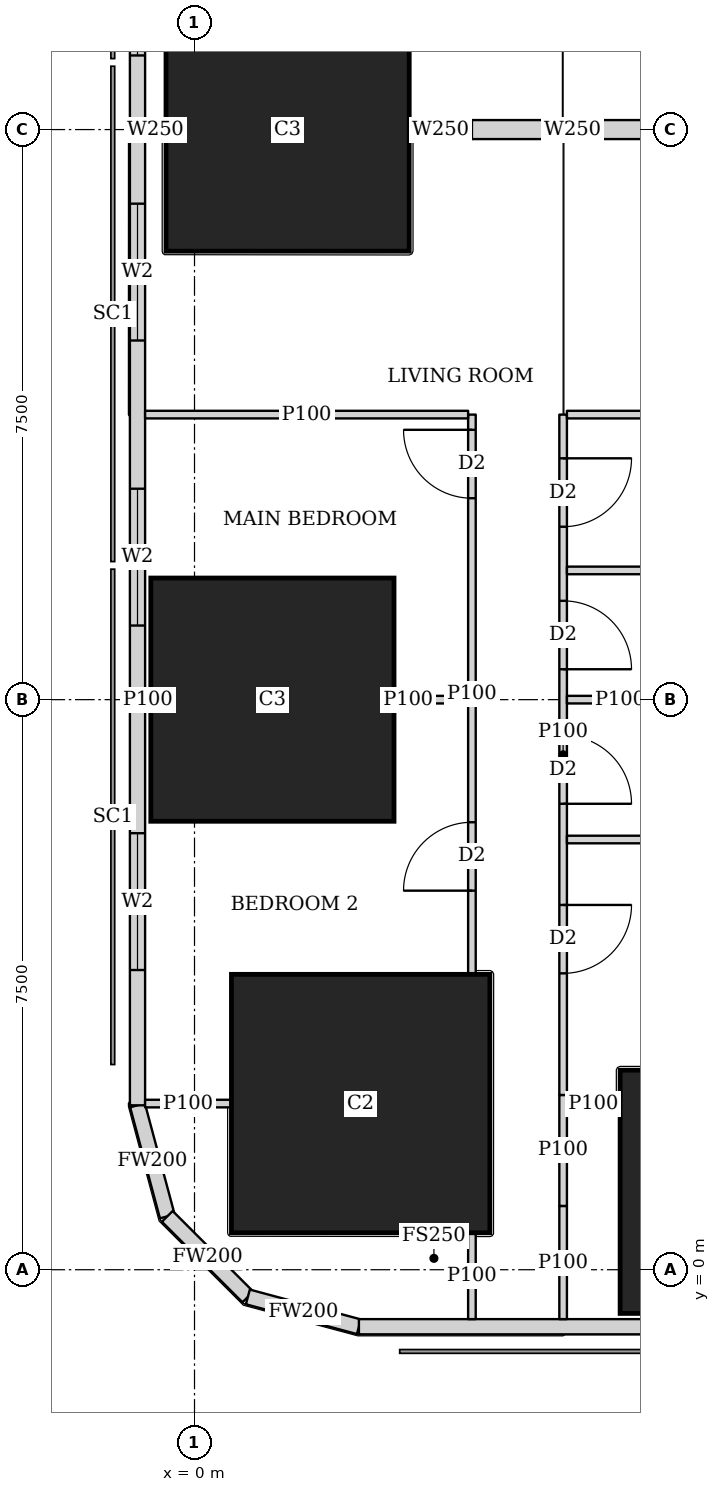
"""IFC4 building model, lengths in metres.
Left out: names, types, materials, properties, quantities, classifications, styles, units other than length and angle.
Written with IfcOpenShell. Run it as: python <this file> out.ifc"""

import sys

from ifc_helpers import new_model, si_unit, direction, frame, frame_2d, origin, origin_2d, place, context, subcontext, project, spatial, rectangle, extrude, element, fill, save


model = new_model("IFC4")
c1 = context("Model", 3, precision=1e-05, world=origin(), true_north=direction((0.0, 1.0)))
c2 = subcontext(c1, "Body", "Model", "MODEL_VIEW")
j1 = project(units=[si_unit("LENGTHUNIT", "METRE"), si_unit("PLANEANGLEUNIT", "RADIAN")], contexts=[c1])
p1 = place(None, origin())
s1 = spatial("IfcSite", under=j1, at=p1, CompositionType="ELEMENT")
p2 = place(p1, origin())
s2 = spatial("IfcBuilding", under=s1, at=p2, CompositionType="ELEMENT")
p3 = place(p2, frame((0.0, 0.0, 23.75)))
s3 = spatial("IfcBuildingStorey", under=s2, at=p3, CompositionType="ELEMENT", Elevation=23.75)
p4 = place(p3, frame((7.2, 1.025, 0.0), z_axis=(0.0, 0.0, 1.0), x_axis=(1.0, 0.0, 0.0)))
e1 = element("IfcColumn", 1, at=p4, inside=s3, PredefinedType="COLUMN", context=c2, shape_type="SweptSolid", body=[
    extrude(rectangle(XDim=3.2, YDim=3.2, at=origin_2d()), origin(), (0.0, 0.0, 1.0), 3.75),
])
p5 = place(p3, frame((2.186, 2.186, 0.0), z_axis=(0.0, 0.0, 1.0), x_axis=(1.0, 0.0, 0.0)))
e2 = element("IfcColumn", 2, at=p5, inside=s3, PredefinedType="COLUMN", context=c2, shape_type="SweptSolid", body=[
    extrude(rectangle(XDim=3.4, YDim=3.4, at=origin_2d()), origin(), (0.0, 0.0, 1.0), 3.75),
])
for number, where, z_axis, x_axis in (
    (3, (1.025, 7.5, 0.0), (0.0, 0.0, 1.0), (1.0, 0.0, 0.0)),
    (4, (1.225, 15.0, 0.0), (0.0, 0.0, 1.0), (1.0, 0.0, 0.0)),
):
    element("IfcColumn", number, at=place(p3, frame(where, z_axis=z_axis, x_axis=x_axis)), inside=s3, PredefinedType="COLUMN", context=c2, shape_type="SweptSolid", body=[
        extrude(rectangle(XDim=3.2, YDim=3.2, at=origin_2d()), origin(), (0.0, 0.0, 1.0), 3.75),
    ])
p6 = place(p3, frame((2.163, -0.75, 0.0), z_axis=(0.0, 0.0, 1.0), x_axis=(1.0, 0.0, 0.0)))
e5 = element("IfcWall", 5, at=p6, inside=s3, PredefinedType="SOLIDWALL", context=c2, shape_type="SweptSolid", body=[
    extrude(rectangle(XDim=45.628, YDim=0.2, at=frame_2d((22.814, 0.0))), origin(), (0.0, 0.0, 1.0), 3.5),
])
p7 = place(p6, frame((9.537, 0.0, 0.9)))
e6 = element("IfcOpeningElement", 6, at=p7, cuts=e5, PredefinedType="OPENING", context=c2, shape_type="SweptSolid", body=[
    extrude(rectangle(XDim=1.8, YDim=1.5, at=frame_2d((0.9, 0.75))), frame((0.0, 0.11, 0.0), z_axis=(0.0, -1.0, 0.0), x_axis=(1.0, 0.0, 0.0)), (0.0, 0.0, 1.0), 0.22),
])
p8 = place(p6, frame((13.137, 0.0, 0.9)))
e7 = element("IfcOpeningElement", 7, at=p8, cuts=e5, PredefinedType="OPENING", context=c2, shape_type="SweptSolid", body=[
    extrude(rectangle(XDim=1.8, YDim=1.5, at=frame_2d((0.9, 0.75))), frame((0.0, 0.11, 0.0), z_axis=(0.0, -1.0, 0.0), x_axis=(1.0, 0.0, 0.0)), (0.0, 0.0, 1.0), 0.22),
])
p9 = place(p6, frame((16.737, 0.0, 0.9)))
e8 = element("IfcOpeningElement", 8, at=p9, cuts=e5, PredefinedType="OPENING", context=c2, shape_type="SweptSolid", body=[
    extrude(rectangle(XDim=1.8, YDim=1.5, at=frame_2d((0.9, 0.75))), frame((0.0, 0.11, 0.0), z_axis=(0.0, -1.0, 0.0), x_axis=(1.0, 0.0, 0.0)), (0.0, 0.0, 1.0), 0.22),
])
p10 = place(p6, frame((20.337, 0.0, 0.9)))
e9 = element("IfcOpeningElement", 9, at=p10, cuts=e5, PredefinedType="OPENING", context=c2, shape_type="SweptSolid", body=[
    extrude(rectangle(XDim=1.8, YDim=1.5, at=frame_2d((0.9, 0.75))), frame((0.0, 0.11, 0.0), z_axis=(0.0, -1.0, 0.0), x_axis=(1.0, 0.0, 0.0)), (0.0, 0.0, 1.0), 0.22),
])
p11 = place(p6, frame((23.937, 0.0, 0.9)))
e10 = element("IfcOpeningElement", 10, at=p11, cuts=e5, PredefinedType="OPENING", context=c2, shape_type="SweptSolid", body=[
    extrude(rectangle(XDim=1.8, YDim=1.5, at=frame_2d((0.9, 0.75))), frame((0.0, 0.11, 0.0), z_axis=(0.0, -1.0, 0.0), x_axis=(1.0, 0.0, 0.0)), (0.0, 0.0, 1.0), 0.22),
])
p12 = place(p6, frame((27.537, 0.0, 0.9)))
e11 = element("IfcOpeningElement", 11, at=p12, cuts=e5, PredefinedType="OPENING", context=c2, shape_type="SweptSolid", body=[
    extrude(rectangle(XDim=1.8, YDim=1.5, at=frame_2d((0.9, 0.75))), frame((0.0, 0.11, 0.0), z_axis=(0.0, -1.0, 0.0), x_axis=(1.0, 0.0, 0.0)), (0.0, 0.0, 1.0), 0.22),
])
p13 = place(p6, frame((31.137, 0.0, 0.9)))
e12 = element("IfcOpeningElement", 12, at=p13, cuts=e5, PredefinedType="OPENING", context=c2, shape_type="SweptSolid", body=[
    extrude(rectangle(XDim=1.8, YDim=1.5, at=frame_2d((0.9, 0.75))), frame((0.0, 0.11, 0.0), z_axis=(0.0, -1.0, 0.0), x_axis=(1.0, 0.0, 0.0)), (0.0, 0.0, 1.0), 0.22),
])
p14 = place(p6, frame((34.737, 0.0, 0.9)))
e13 = element("IfcOpeningElement", 13, at=p14, cuts=e5, PredefinedType="OPENING", context=c2, shape_type="SweptSolid", body=[
    extrude(rectangle(XDim=1.8, YDim=1.5, at=frame_2d((0.9, 0.75))), frame((0.0, 0.11, 0.0), z_axis=(0.0, -1.0, 0.0), x_axis=(1.0, 0.0, 0.0)), (0.0, 0.0, 1.0), 0.22),
])
p15 = place(p3, frame((-0.75, 42.837, 0.0), z_axis=(0.0, 0.0, 1.0), x_axis=(0.0, -1.0, 0.0)))
e14 = element("IfcWall", 14, at=p15, inside=s3, PredefinedType="SOLIDWALL", context=c2, shape_type="SweptSolid", body=[
    extrude(rectangle(XDim=40.674, YDim=0.2, at=frame_2d((20.337, 0.0))), origin(), (0.0, 0.0, 1.0), 3.5),
])
p16 = place(p15, frame((1.78, 0.0, 0.9)))
e15 = element("IfcOpeningElement", 15, at=p16, cuts=e14, PredefinedType="OPENING", context=c2, shape_type="SweptSolid", body=[
    extrude(rectangle(XDim=1.8, YDim=1.5, at=frame_2d((0.9, 0.75))), frame((0.0, 0.11, 0.0), z_axis=(0.0, -1.0, 0.0), x_axis=(1.0, 0.0, 0.0)), (0.0, 0.0, 1.0), 0.22),
])
p17 = place(p15, frame((6.312, 0.0, 0.9)))
e16 = element("IfcOpeningElement", 16, at=p17, cuts=e14, PredefinedType="OPENING", context=c2, shape_type="SweptSolid", body=[
    extrude(rectangle(XDim=1.8, YDim=1.5, at=frame_2d((0.9, 0.75))), frame((0.0, 0.11, 0.0), z_axis=(0.0, -1.0, 0.0), x_axis=(1.0, 0.0, 0.0)), (0.0, 0.0, 1.0), 0.22),
])
p18 = place(p15, frame((10.062, 0.0, 0.9)))
e17 = element("IfcOpeningElement", 17, at=p18, cuts=e14, PredefinedType="OPENING", context=c2, shape_type="SweptSolid", body=[
    extrude(rectangle(XDim=1.8, YDim=1.5, at=frame_2d((0.9, 0.75))), frame((0.0, 0.11, 0.0), z_axis=(0.0, -1.0, 0.0), x_axis=(1.0, 0.0, 0.0)), (0.0, 0.0, 1.0), 0.22),
])
p19 = place(p15, frame((13.812, 0.0, 0.9)))
e18 = element("IfcOpeningElement", 18, at=p19, cuts=e14, PredefinedType="OPENING", context=c2, shape_type="SweptSolid", body=[
    extrude(rectangle(XDim=1.8, YDim=1.5, at=frame_2d((0.9, 0.75))), frame((0.0, 0.11, 0.0), z_axis=(0.0, -1.0, 0.0), x_axis=(1.0, 0.0, 0.0)), (0.0, 0.0, 1.0), 0.22),
])
p20 = place(p15, frame((17.562, 0.0, 0.9)))
e19 = element("IfcOpeningElement", 19, at=p20, cuts=e14, PredefinedType="OPENING", context=c2, shape_type="SweptSolid", body=[
    extrude(rectangle(XDim=1.8, YDim=1.5, at=frame_2d((0.9, 0.75))), frame((0.0, 0.11, 0.0), z_axis=(0.0, -1.0, 0.0), x_axis=(1.0, 0.0, 0.0)), (0.0, 0.0, 1.0), 0.22),
])
p21 = place(p15, frame((21.312, 0.0, 0.9)))
e20 = element("IfcOpeningElement", 20, at=p21, cuts=e14, PredefinedType="OPENING", context=c2, shape_type="SweptSolid", body=[
    extrude(rectangle(XDim=1.8, YDim=1.5, at=frame_2d((0.9, 0.75))), frame((0.0, 0.11, 0.0), z_axis=(0.0, -1.0, 0.0), x_axis=(1.0, 0.0, 0.0)), (0.0, 0.0, 1.0), 0.22),
])
p22 = place(p15, frame((25.062, 0.0, 0.9)))
e21 = element("IfcOpeningElement", 21, at=p22, cuts=e14, PredefinedType="OPENING", context=c2, shape_type="SweptSolid", body=[
    extrude(rectangle(XDim=1.8, YDim=1.5, at=frame_2d((0.9, 0.75))), frame((0.0, 0.11, 0.0), z_axis=(0.0, -1.0, 0.0), x_axis=(1.0, 0.0, 0.0)), (0.0, 0.0, 1.0), 0.22),
])
p23 = place(p15, frame((28.812, 0.0, 0.9)))
e22 = element("IfcOpeningElement", 22, at=p23, cuts=e14, PredefinedType="OPENING", context=c2, shape_type="SweptSolid", body=[
    extrude(rectangle(XDim=1.8, YDim=1.5, at=frame_2d((0.9, 0.75))), frame((0.0, 0.11, 0.0), z_axis=(0.0, -1.0, 0.0), x_axis=(1.0, 0.0, 0.0)), (0.0, 0.0, 1.0), 0.22),
])
p24 = place(p15, frame((32.562, 0.0, 0.9)))
e23 = element("IfcOpeningElement", 23, at=p24, cuts=e14, PredefinedType="OPENING", context=c2, shape_type="SweptSolid", body=[
    extrude(rectangle(XDim=1.8, YDim=1.5, at=frame_2d((0.9, 0.75))), frame((0.0, 0.11, 0.0), z_axis=(0.0, -1.0, 0.0), x_axis=(1.0, 0.0, 0.0)), (0.0, 0.0, 1.0), 0.22),
])
p25 = place(p15, frame((37.094, 0.0, 0.9)))
e24 = element("IfcOpeningElement", 24, at=p25, cuts=e14, PredefinedType="OPENING", context=c2, shape_type="SweptSolid", body=[
    extrude(rectangle(XDim=1.8, YDim=1.5, at=frame_2d((0.9, 0.75))), frame((0.0, 0.11, 0.0), z_axis=(0.0, -1.0, 0.0), x_axis=(1.0, 0.0, 0.0)), (0.0, 0.0, 1.0), 0.22),
])
p26 = place(p3, frame((-0.75, 2.163, 0.0), z_axis=(0.0, 0.0, 1.0), x_axis=(0.259168954497, -0.965832000415, 0.0)))
e25 = element("IfcWall", 25, at=p26, inside=s3, PredefinedType="SOLIDWALL", context=c2, shape_type="SweptSolid", body=[
    extrude(rectangle(XDim=1.513, YDim=0.2, at=frame_2d((0.756, 0.0))), origin(), (0.0, 0.0, 1.0), 3.5),
])
p27 = place(p3, frame((-0.358, 0.702, 0.0), z_axis=(0.0, 0.0, 1.0), x_axis=(0.707106781187, -0.707106781187, 0.0)))
e26 = element("IfcWall", 26, at=p27, inside=s3, PredefinedType="SOLIDWALL", context=c2, shape_type="SweptSolid", body=[
    extrude(rectangle(XDim=1.499, YDim=0.2, at=frame_2d((0.75, 0.0))), origin(), (0.0, 0.0, 1.0), 3.5),
])
p28 = place(p3, frame((0.702, -0.358, 0.0), z_axis=(0.0, 0.0, 1.0), x_axis=(0.965832000415, -0.259168954497, 0.0)))
e27 = element("IfcWall", 27, at=p28, inside=s3, PredefinedType="SOLIDWALL", context=c2, shape_type="SweptSolid", body=[
    extrude(rectangle(XDim=1.513, YDim=0.2, at=frame_2d((0.756, 0.0))), origin(), (0.0, 0.0, 1.0), 3.5),
])
p29 = place(p3, frame((3.65, -0.65, 0.0), z_axis=(0.0, 0.0, 1.0), x_axis=(0.0, 1.0, 0.0)))
e28 = element("IfcWall", 28, at=p29, inside=s3, PredefinedType="PARTITIONING", context=c2, shape_type="SweptSolid", body=[
    extrude(rectangle(XDim=1.135, YDim=0.1, at=frame_2d((0.567, 0.0))), origin(), (0.0, 0.0, 1.0), 3.5),
])
p30 = place(p3, frame((3.65, 3.887, 0.0), z_axis=(0.0, 0.0, 1.0), x_axis=(0.0, 1.0, 0.0)))
e29 = element("IfcWall", 29, at=p30, inside=s3, PredefinedType="PARTITIONING", context=c2, shape_type="SweptSolid", body=[
    extrude(rectangle(XDim=7.363, YDim=0.1, at=frame_2d((3.682, 0.0))), origin(), (0.0, 0.0, 1.0), 3.5),
])
p31 = place(p30, frame((6.263, 0.0, 0.0)))
e30 = element("IfcOpeningElement", 30, at=p31, cuts=e29, PredefinedType="OPENING", context=c2, shape_type="SweptSolid", body=[
    extrude(rectangle(XDim=0.9, YDim=2.1, at=frame_2d((0.45, 1.05))), frame((0.0, 0.06, 0.0), z_axis=(0.0, -1.0, 0.0), x_axis=(1.0, 0.0, 0.0)), (0.0, 0.0, 1.0), 0.12),
])
p32 = place(p30, frame((1.1, 0.0, 0.0)))
e31 = element("IfcOpeningElement", 31, at=p32, cuts=e29, PredefinedType="OPENING", context=c2, shape_type="SweptSolid", body=[
    extrude(rectangle(XDim=0.9, YDim=2.1, at=frame_2d((0.45, 1.05))), frame((0.0, 0.06, 0.0), z_axis=(0.0, -1.0, 0.0), x_axis=(1.0, 0.0, 0.0)), (0.0, 0.0, 1.0), 0.12),
])
p33 = place(p3, frame((4.85, -0.65, 0.0), z_axis=(0.0, 0.0, 1.0), x_axis=(0.0, 1.0, 0.0)))
e32 = element("IfcWall", 32, at=p33, inside=s3, PredefinedType="PARTITIONING", context=c2, shape_type="SweptSolid", body=[
    extrude(rectangle(XDim=1.489, YDim=0.1, at=frame_2d((0.745, 0.0))), origin(), (0.0, 0.0, 1.0), 3.5),
])
p34 = place(p3, frame((4.85, 0.839, 0.0), z_axis=(0.0, 0.0, 1.0), x_axis=(0.0, 1.0, 0.0)))
e33 = element("IfcWall", 33, at=p34, inside=s3, PredefinedType="PARTITIONING", context=c2, shape_type="SweptSolid", body=[
    extrude(rectangle(XDim=1.46, YDim=0.1, at=frame_2d((0.73, 0.0))), origin(), (0.0, 0.0, 1.0), 2.1),
])
p35 = place(p3, frame((4.85, 2.299, 0.0), z_axis=(0.0, 0.0, 1.0), x_axis=(0.0, 1.0, 0.0)))
e34 = element("IfcWall", 34, at=p35, inside=s3, PredefinedType="PARTITIONING", context=c2, shape_type="SweptSolid", body=[
    extrude(rectangle(XDim=8.951, YDim=0.1, at=frame_2d((4.476, 0.0))), origin(), (0.0, 0.0, 1.0), 3.5),
])
p36 = place(p35, frame((7.476, 0.0, 0.0)))
e35 = element("IfcOpeningElement", 35, at=p36, cuts=e34, PredefinedType="OPENING", context=c2, shape_type="SweptSolid", body=[
    extrude(rectangle(XDim=0.9, YDim=2.1, at=frame_2d((0.45, 1.05))), frame((0.0, 0.06, 0.0), z_axis=(0.0, -1.0, 0.0), x_axis=(1.0, 0.0, 0.0)), (0.0, 0.0, 1.0), 0.12),
])
p37 = place(p35, frame((3.831, 0.0, 0.0)))
e36 = element("IfcOpeningElement", 36, at=p37, cuts=e34, PredefinedType="OPENING", context=c2, shape_type="SweptSolid", body=[
    extrude(rectangle(XDim=0.9, YDim=2.1, at=frame_2d((0.45, 1.05))), frame((0.0, 0.06, 0.0), z_axis=(0.0, -1.0, 0.0), x_axis=(1.0, 0.0, 0.0)), (0.0, 0.0, 1.0), 0.12),
])
p38 = place(p35, frame((5.601, 0.0, 0.0)))
e37 = element("IfcOpeningElement", 37, at=p38, cuts=e34, PredefinedType="OPENING", context=c2, shape_type="SweptSolid", body=[
    extrude(rectangle(XDim=0.9, YDim=2.1, at=frame_2d((0.45, 1.05))), frame((0.0, 0.06, 0.0), z_axis=(0.0, -1.0, 0.0), x_axis=(1.0, 0.0, 0.0)), (0.0, 0.0, 1.0), 0.12),
])
p39 = place(p35, frame((1.6, 0.0, 0.0)))
e38 = element("IfcOpeningElement", 38, at=p39, cuts=e34, PredefinedType="OPENING", context=c2, shape_type="SweptSolid", body=[
    extrude(rectangle(XDim=0.9, YDim=2.1, at=frame_2d((0.45, 1.05))), frame((0.0, 0.06, 0.0), z_axis=(0.0, -1.0, 0.0), x_axis=(1.0, 0.0, 0.0)), (0.0, 0.0, 1.0), 0.12),
])
p40 = place(p3, frame((-0.65, 2.186, 0.0), z_axis=(0.0, 0.0, 1.0), x_axis=(1.0, 0.0, 0.0)))
e39 = element("IfcWall", 39, at=p40, inside=s3, PredefinedType="PARTITIONING", context=c2, shape_type="SweptSolid", body=[
    extrude(rectangle(XDim=1.135, YDim=0.1, at=frame_2d((0.567, 0.0))), origin(), (0.0, 0.0, 1.0), 3.5),
])
p41 = place(p3, frame((-0.65, 7.5, 0.0), z_axis=(0.0, 0.0, 1.0), x_axis=(1.0, 0.0, 0.0)))
e40 = element("IfcWall", 40, at=p41, inside=s3, PredefinedType="PARTITIONING", context=c2, shape_type="SweptSolid", body=[
    extrude(rectangle(XDim=0.074, YDim=0.1, at=frame_2d((0.037, 0.0))), origin(), (0.0, 0.0, 1.0), 3.5),
])
p42 = place(p3, frame((2.626, 7.5, 0.0), z_axis=(0.0, 0.0, 1.0), x_axis=(1.0, 0.0, 0.0)))
e41 = element("IfcWall", 41, at=p42, inside=s3, PredefinedType="PARTITIONING", context=c2, shape_type="SweptSolid", body=[
    extrude(rectangle(XDim=0.974, YDim=0.1, at=frame_2d((0.487, 0.0))), origin(), (0.0, 0.0, 1.0), 3.5),
])
p43 = place(p3, frame((-0.65, 11.25, 0.0), z_axis=(0.0, 0.0, 1.0), x_axis=(1.0, 0.0, 0.0)))
e42 = element("IfcWall", 42, at=p43, inside=s3, PredefinedType="PARTITIONING", context=c2, shape_type="SweptSolid", body=[
    extrude(rectangle(XDim=4.25, YDim=0.1, at=frame_2d((2.125, 0.0))), origin(), (0.0, 0.0, 1.0), 2.05),
])
p44 = place(p3, frame((4.9, 2.186, 0.0), z_axis=(0.0, 0.0, 1.0), x_axis=(1.0, 0.0, 0.0)))
e43 = element("IfcWall", 43, at=p44, inside=s3, PredefinedType="PARTITIONING", context=c2, shape_type="SweptSolid", body=[
    extrude(rectangle(XDim=0.699, YDim=0.1, at=frame_2d((0.35, 0.0))), origin(), (0.0, 0.0, 1.0), 2.1),
])
p45 = place(p3, frame((4.9, 7.5, 0.0), z_axis=(0.0, 0.0, 1.0), x_axis=(1.0, 0.0, 0.0)))
e44 = element("IfcWall", 44, at=p45, inside=s3, PredefinedType="PARTITIONING", context=c2, shape_type="SweptSolid", body=[
    extrude(rectangle(XDim=1.399, YDim=0.1, at=frame_2d((0.7, 0.0))), origin(), (0.0, 0.0, 1.0), 3.5),
])
for number, where, z_axis, x_axis in (
    (45, (4.9, 11.25, 0.0), (0.0, 0.0, 1.0), (1.0, 0.0, 0.0)),
    (46, (4.9, 9.2, 0.0), (0.0, 0.0, 1.0), (1.0, 0.0, 0.0)),
    (47, (4.9, 5.66, 0.0), (0.0, 0.0, 1.0), (1.0, 0.0, 0.0)),
):
    element("IfcWall", number, at=place(p3, frame(where, z_axis=z_axis, x_axis=x_axis)), inside=s3, PredefinedType="PARTITIONING", context=c2, shape_type="SweptSolid", body=[
        extrude(rectangle(XDim=3.525, YDim=0.1, at=frame_2d((1.763, 0.0))), origin(), (0.0, 0.0, 1.0), 3.5),
    ])
p46 = place(p3, frame((-0.65, 15.0, 0.0), z_axis=(0.0, 0.0, 1.0), x_axis=(1.0, 0.0, 0.0)))
e48 = element("IfcWall", 48, at=p46, inside=s3, PredefinedType="SOLIDWALL", context=c2, shape_type="SweptSolid", body=[
    extrude(rectangle(XDim=0.274, YDim=0.25, at=frame_2d((0.137, 0.0))), origin(), (0.0, 0.0, 1.0), 2.05),
])
p47 = place(p3, frame((2.826, 15.0, 0.0), z_axis=(0.0, 0.0, 1.0), x_axis=(1.0, 0.0, 0.0)))
e49 = element("IfcWall", 49, at=p47, inside=s3, PredefinedType="SOLIDWALL", context=c2, shape_type="SweptSolid", body=[
    extrude(rectangle(XDim=0.824, YDim=0.25, at=frame_2d((0.412, 0.0))), origin(), (0.0, 0.0, 1.0), 2.05),
])
p48 = place(p3, frame((3.65, 15.0, 0.0), z_axis=(0.0, 0.0, 1.0), x_axis=(1.0, 0.0, 0.0)))
e50 = element("IfcWall", 50, at=p48, inside=s3, PredefinedType="SOLIDWALL", context=c2, shape_type="SweptSolid", body=[
    extrude(rectangle(XDim=2.649, YDim=0.25, at=frame_2d((1.325, 0.0))), origin(), (0.0, 0.0, 1.0), 3.5),
])
p49 = place(p22, origin())
e51 = element("IfcWindow", 51, at=p49, inside=s3, PartitioningType="SINGLE_PANEL", PredefinedType="WINDOW", context=c2, shape_type="SweptSolid", body=[
    extrude(rectangle(XDim=1.8, YDim=1.5, at=frame_2d((0.9, 0.75))), frame((0.0, 0.03, 0.0), z_axis=(0.0, -1.0, 0.0), x_axis=(1.0, 0.0, 0.0)), (0.0, 0.0, 1.0), 0.06),
])
fill(e21, e51)
p50 = place(p23, origin())
e52 = element("IfcWindow", 52, at=p50, inside=s3, PartitioningType="SINGLE_PANEL", PredefinedType="WINDOW", context=c2, shape_type="SweptSolid", body=[
    extrude(rectangle(XDim=1.8, YDim=1.5, at=frame_2d((0.9, 0.75))), frame((0.0, 0.03, 0.0), z_axis=(0.0, -1.0, 0.0), x_axis=(1.0, 0.0, 0.0)), (0.0, 0.0, 1.0), 0.06),
])
fill(e22, e52)
p51 = place(p24, origin())
e53 = element("IfcWindow", 53, at=p51, inside=s3, PartitioningType="SINGLE_PANEL", PredefinedType="WINDOW", context=c2, shape_type="SweptSolid", body=[
    extrude(rectangle(XDim=1.8, YDim=1.5, at=frame_2d((0.9, 0.75))), frame((0.0, 0.03, 0.0), z_axis=(0.0, -1.0, 0.0), x_axis=(1.0, 0.0, 0.0)), (0.0, 0.0, 1.0), 0.06),
])
fill(e23, e53)
p52 = place(p25, origin())
e54 = element("IfcWindow", 54, at=p52, inside=s3, PartitioningType="SINGLE_PANEL", PredefinedType="WINDOW", context=c2, shape_type="SweptSolid", body=[
    extrude(rectangle(XDim=1.8, YDim=1.5, at=frame_2d((0.9, 0.75))), frame((0.0, 0.03, 0.0), z_axis=(0.0, -1.0, 0.0), x_axis=(1.0, 0.0, 0.0)), (0.0, 0.0, 1.0), 0.06),
])
fill(e24, e54)
p53 = place(p31, origin())
e55 = element("IfcDoor", 55, at=p53, inside=s3, OperationType="SINGLE_SWING_RIGHT", PredefinedType="DOOR", context=c2, shape_type="SweptSolid", body=[
    extrude(rectangle(XDim=0.9, YDim=2.1, at=frame_2d((0.45, 1.05))), frame((0.0, 0.025, 0.0), z_axis=(0.0, -1.0, 0.0), x_axis=(1.0, 0.0, 0.0)), (0.0, 0.0, 1.0), 0.05),
])
fill(e30, e55)
p54 = place(p32, origin())
e56 = element("IfcDoor", 56, at=p54, inside=s3, OperationType="SINGLE_SWING_LEFT", PredefinedType="DOOR", context=c2, shape_type="SweptSolid", body=[
    extrude(rectangle(XDim=0.9, YDim=2.1, at=frame_2d((0.45, 1.05))), frame((0.0, 0.025, 0.0), z_axis=(0.0, -1.0, 0.0), x_axis=(1.0, 0.0, 0.0)), (0.0, 0.0, 1.0), 0.05),
])
fill(e31, e56)
p55 = place(p36, origin())
e57 = element("IfcDoor", 57, at=p55, inside=s3, OperationType="SINGLE_SWING_LEFT", PredefinedType="DOOR", context=c2, shape_type="SweptSolid", body=[
    extrude(rectangle(XDim=0.9, YDim=2.1, at=frame_2d((0.45, 1.05))), frame((0.0, 0.025, 0.0), z_axis=(0.0, -1.0, 0.0), x_axis=(1.0, 0.0, 0.0)), (0.0, 0.0, 1.0), 0.05),
])
fill(e35, e57)
p56 = place(p37, origin())
e58 = element("IfcDoor", 58, at=p56, inside=s3, OperationType="SINGLE_SWING_RIGHT", PredefinedType="DOOR", context=c2, shape_type="SweptSolid", body=[
    extrude(rectangle(XDim=0.9, YDim=2.1, at=frame_2d((0.45, 1.05))), frame((0.0, 0.025, 0.0), z_axis=(0.0, -1.0, 0.0), x_axis=(1.0, 0.0, 0.0)), (0.0, 0.0, 1.0), 0.05),
])
fill(e36, e58)
p57 = place(p38, origin())
e59 = element("IfcDoor", 59, at=p57, inside=s3, OperationType="SINGLE_SWING_RIGHT", PredefinedType="DOOR", context=c2, shape_type="SweptSolid", body=[
    extrude(rectangle(XDim=0.9, YDim=2.1, at=frame_2d((0.45, 1.05))), frame((0.0, 0.025, 0.0), z_axis=(0.0, -1.0, 0.0), x_axis=(1.0, 0.0, 0.0)), (0.0, 0.0, 1.0), 0.05),
])
fill(e37, e59)
p58 = place(p39, origin())
e60 = element("IfcDoor", 60, at=p58, inside=s3, OperationType="SINGLE_SWING_LEFT", PredefinedType="DOOR", context=c2, shape_type="SweptSolid", body=[
    extrude(rectangle(XDim=0.9, YDim=2.1, at=frame_2d((0.45, 1.05))), frame((0.0, 0.025, 0.0), z_axis=(0.0, -1.0, 0.0), x_axis=(1.0, 0.0, 0.0)), (0.0, 0.0, 1.0), 0.05),
])
fill(e38, e60)
save(model, sys.argv[1])
